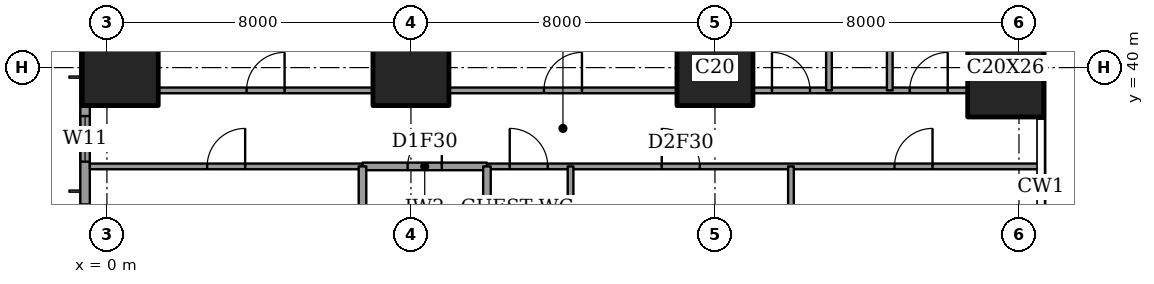
"""IFC4 building model, lengths in metres.
Left out: names, types, materials, properties, quantities, classifications, styles, units other than length and angle.
Written with IfcOpenShell. Run it as: python <this file> out.ifc"""

import sys

from ifc_helpers import new_model, si_unit, direction, frame, frame_2d, origin, origin_2d, place, context, subcontext, project, spatial, rectangle, extrude, element, fill, save


model = new_model("IFC4")
c1 = context("Model", 3, precision=1e-05, world=origin(), true_north=direction((0.0, 1.0)))
c2 = subcontext(c1, "Body", "Model", "MODEL_VIEW")
j1 = project(units=[si_unit("LENGTHUNIT", "METRE"), si_unit("PLANEANGLEUNIT", "RADIAN")], contexts=[c1])
p1 = place(None, origin())
s1 = spatial("IfcSite", under=j1, at=p1, CompositionType="ELEMENT")
p2 = place(p1, origin())
s2 = spatial("IfcBuilding", under=s1, at=p2, CompositionType="ELEMENT")
p3 = place(p2, frame((0.0, 0.0, 135.8)))
s3 = spatial("IfcBuildingStorey", under=s2, at=p3, CompositionType="ELEMENT", Elevation=135.8)
for number, where, z_axis, x_axis in (
    (1, (0.35, 40.0, 0.0), (0.0, 0.0, 1.0), (1.0, 0.0, 0.0)),
    (2, (8.0, 40.0, 0.0), (0.0, 0.0, 1.0), (1.0, 0.0, 0.0)),
    (3, (16.0, 40.0, 0.0), (0.0, 0.0, 1.0), (1.0, 0.0, 0.0)),
):
    element("IfcColumn", number, at=place(p3, frame(where, z_axis=z_axis, x_axis=x_axis)), inside=s3, PredefinedType="COLUMN", context=c2, shape_type="SweptSolid", body=[
        extrude(rectangle(XDim=2.0, YDim=2.0, at=origin_2d()), origin(), (0.0, 0.0, 1.0), 3.6),
    ])
p4 = place(p3, frame((23.65, 40.0, 0.0), z_axis=(0.0, 0.0, 1.0), x_axis=(1.0, 0.0, 0.0)))
e4 = element("IfcColumn", 4, at=p4, inside=s3, PredefinedType="COLUMN", context=c2, shape_type="SweptSolid", body=[
    extrude(rectangle(XDim=2.0, YDim=2.6, at=origin_2d()), origin(), (0.0, 0.0, 1.0), 3.6),
])
p5 = place(p3, frame((-0.575, 44.825, 0.0), z_axis=(0.0, 0.0, 1.0), x_axis=(0.0, -1.0, 0.0)))
e5 = element("IfcWall", 5, at=p5, inside=s3, PredefinedType="SOLIDWALL", context=c2, shape_type="SweptSolid", body=[
    extrude(rectangle(XDim=41.65, YDim=0.25, at=frame_2d((20.825, 0.0))), origin(), (0.0, 0.0, 1.0), 3.6),
])
p6 = place(p5, frame((0.775, 0.0, 0.4)))
e6 = element("IfcOpeningElement", 6, at=p6, cuts=e5, PredefinedType="OPENING", context=c2, shape_type="SweptSolid", body=[
    extrude(rectangle(XDim=2.4, YDim=2.2, at=frame_2d((1.2, 1.1))), frame((0.0, 0.135, 0.0), z_axis=(0.0, -1.0, 0.0), x_axis=(1.0, 0.0, 0.0)), (0.0, 0.0, 1.0), 0.27),
])
p7 = place(p5, frame((6.1, 0.0, 0.4)))
e7 = element("IfcOpeningElement", 7, at=p7, cuts=e5, PredefinedType="OPENING", context=c2, shape_type="SweptSolid", body=[
    extrude(rectangle(XDim=1.2, YDim=2.2, at=frame_2d((0.6, 1.1))), frame((0.0, 0.135, 0.0), z_axis=(0.0, -1.0, 0.0), x_axis=(1.0, 0.0, 0.0)), (0.0, 0.0, 1.0), 0.27),
])
p8 = place(p5, frame((8.425, 0.0, 0.4)))
e8 = element("IfcOpeningElement", 8, at=p8, cuts=e5, PredefinedType="OPENING", context=c2, shape_type="SweptSolid", body=[
    extrude(rectangle(XDim=2.4, YDim=2.2, at=frame_2d((1.2, 1.1))), frame((0.0, 0.135, 0.0), z_axis=(0.0, -1.0, 0.0), x_axis=(1.0, 0.0, 0.0)), (0.0, 0.0, 1.0), 0.27),
])
p9 = place(p5, frame((15.625, 0.0, 0.4)))
e9 = element("IfcOpeningElement", 9, at=p9, cuts=e5, PredefinedType="OPENING", context=c2, shape_type="SweptSolid", body=[
    extrude(rectangle(XDim=2.4, YDim=2.2, at=frame_2d((1.2, 1.1))), frame((0.0, 0.135, 0.0), z_axis=(0.0, -1.0, 0.0), x_axis=(1.0, 0.0, 0.0)), (0.0, 0.0, 1.0), 0.27),
])
p10 = place(p5, frame((23.625, 0.0, 0.4)))
e10 = element("IfcOpeningElement", 10, at=p10, cuts=e5, PredefinedType="OPENING", context=c2, shape_type="SweptSolid", body=[
    extrude(rectangle(XDim=2.4, YDim=2.2, at=frame_2d((1.2, 1.1))), frame((0.0, 0.135, 0.0), z_axis=(0.0, -1.0, 0.0), x_axis=(1.0, 0.0, 0.0)), (0.0, 0.0, 1.0), 0.27),
])
p11 = place(p5, frame((30.825, 0.0, 0.4)))
e11 = element("IfcOpeningElement", 11, at=p11, cuts=e5, PredefinedType="OPENING", context=c2, shape_type="SweptSolid", body=[
    extrude(rectangle(XDim=2.4, YDim=2.2, at=frame_2d((1.2, 1.1))), frame((0.0, 0.135, 0.0), z_axis=(0.0, -1.0, 0.0), x_axis=(1.0, 0.0, 0.0)), (0.0, 0.0, 1.0), 0.27),
])
p12 = place(p5, frame((34.5, 0.0, 0.4)))
e12 = element("IfcOpeningElement", 12, at=p12, cuts=e5, PredefinedType="OPENING", context=c2, shape_type="SweptSolid", body=[
    extrude(rectangle(XDim=1.2, YDim=2.2, at=frame_2d((0.6, 1.1))), frame((0.0, 0.135, 0.0), z_axis=(0.0, -1.0, 0.0), x_axis=(1.0, 0.0, 0.0)), (0.0, 0.0, 1.0), 0.27),
])
p13 = place(p5, frame((38.475, 0.0, 0.4)))
e13 = element("IfcOpeningElement", 13, at=p13, cuts=e5, PredefinedType="OPENING", context=c2, shape_type="SweptSolid", body=[
    extrude(rectangle(XDim=2.4, YDim=2.2, at=frame_2d((1.2, 1.1))), frame((0.0, 0.135, 0.0), z_axis=(0.0, -1.0, 0.0), x_axis=(1.0, 0.0, 0.0)), (0.0, 0.0, 1.0), 0.27),
])
p14 = place(p3, frame((6.725, 37.4, 0.0), z_axis=(0.0, 0.0, 1.0), x_axis=(1.0, 0.0, 0.0)))
e14 = element("IfcWall", 14, at=p14, inside=s3, PredefinedType="PARTITIONING", context=c2, shape_type="SweptSolid", body=[
    extrude(rectangle(XDim=3.275, YDim=0.2, at=frame_2d((1.637, 0.0))), origin(), (0.0, 0.0, 1.0), 3.35),
])
p15 = place(p14, frame((1.188, 0.0, 0.0)))
e15 = element("IfcOpeningElement", 15, at=p15, cuts=e14, PredefinedType="OPENING", context=c2, shape_type="SweptSolid", body=[
    extrude(rectangle(XDim=0.9, YDim=2.1, at=frame_2d((0.45, 1.05))), frame((0.0, 0.11, 0.0), z_axis=(0.0, -1.0, 0.0), x_axis=(1.0, 0.0, 0.0)), (0.0, 0.0, 1.0), 0.22),
])
p16 = place(p3, frame((-0.45, 37.4, 0.0), z_axis=(0.0, 0.0, 1.0), x_axis=(1.0, 0.0, 0.0)))
e16 = element("IfcWall", 16, at=p16, inside=s3, PredefinedType="PARTITIONING", context=c2, shape_type="SweptSolid", body=[
    extrude(rectangle(XDim=7.175, YDim=0.15, at=frame_2d((3.587, 0.0))), origin(), (0.0, 0.0, 1.0), 3.35),
])
p17 = place(p16, frame((3.087, 0.0, 0.0)))
e17 = element("IfcOpeningElement", 17, at=p17, cuts=e16, PredefinedType="OPENING", context=c2, shape_type="SweptSolid", body=[
    extrude(rectangle(XDim=1.0, YDim=2.1, at=frame_2d((0.5, 1.05))), frame((0.0, 0.085, 0.0), z_axis=(0.0, -1.0, 0.0), x_axis=(1.0, 0.0, 0.0)), (0.0, 0.0, 1.0), 0.17),
])
p18 = place(p3, frame((10.0, 37.4, 0.0), z_axis=(0.0, 0.0, 1.0), x_axis=(1.0, 0.0, 0.0)))
e18 = element("IfcWall", 18, at=p18, inside=s3, PredefinedType="PARTITIONING", context=c2, shape_type="SweptSolid", body=[
    extrude(rectangle(XDim=14.561, YDim=0.15, at=frame_2d((7.281, 0.0))), origin(), (0.0, 0.0, 1.0), 3.35),
])
p19 = place(p18, frame((0.6, 0.0, 0.0)))
e19 = element("IfcOpeningElement", 19, at=p19, cuts=e18, PredefinedType="OPENING", context=c2, shape_type="SweptSolid", body=[
    extrude(rectangle(XDim=1.0, YDim=2.1, at=frame_2d((0.5, 1.05))), frame((0.0, 0.085, 0.0), z_axis=(0.0, -1.0, 0.0), x_axis=(1.0, 0.0, 0.0)), (0.0, 0.0, 1.0), 0.17),
])
p20 = place(p18, frame((4.6, 0.0, 0.0)))
e20 = element("IfcOpeningElement", 20, at=p20, cuts=e18, PredefinedType="OPENING", context=c2, shape_type="SweptSolid", body=[
    extrude(rectangle(XDim=1.0, YDim=2.1, at=frame_2d((0.5, 1.05))), frame((0.0, 0.085, 0.0), z_axis=(0.0, -1.0, 0.0), x_axis=(1.0, 0.0, 0.0)), (0.0, 0.0, 1.0), 0.17),
])
p21 = place(p18, frame((10.725, 0.0, 0.0)))
e21 = element("IfcOpeningElement", 21, at=p21, cuts=e18, PredefinedType="OPENING", context=c2, shape_type="SweptSolid", body=[
    extrude(rectangle(XDim=1.0, YDim=2.1, at=frame_2d((0.5, 1.05))), frame((0.0, 0.085, 0.0), z_axis=(0.0, -1.0, 0.0), x_axis=(1.0, 0.0, 0.0)), (0.0, 0.0, 1.0), 0.17),
])
p22 = place(p3, frame((1.35, 39.4, 0.0), z_axis=(0.0, 0.0, 1.0), x_axis=(1.0, 0.0, 0.0)))
e22 = element("IfcWall", 22, at=p22, inside=s3, PredefinedType="PARTITIONING", context=c2, shape_type="SweptSolid", body=[
    extrude(rectangle(XDim=5.65, YDim=0.15, at=frame_2d((2.825, 0.0))), origin(), (0.0, 0.0, 1.0), 3.35),
])
p23 = place(p22, frame((2.325, 0.0, 0.0)))
e23 = element("IfcOpeningElement", 23, at=p23, cuts=e22, PredefinedType="OPENING", context=c2, shape_type="SweptSolid", body=[
    extrude(rectangle(XDim=1.0, YDim=2.1, at=frame_2d((0.5, 1.05))), frame((0.0, 0.085, 0.0), z_axis=(0.0, -1.0, 0.0), x_axis=(1.0, 0.0, 0.0)), (0.0, 0.0, 1.0), 0.17),
])
p24 = place(p3, frame((9.0, 39.4, 0.0), z_axis=(0.0, 0.0, 1.0), x_axis=(1.0, 0.0, 0.0)))
e24 = element("IfcWall", 24, at=p24, inside=s3, PredefinedType="PARTITIONING", context=c2, shape_type="SweptSolid", body=[
    extrude(rectangle(XDim=6.0, YDim=0.15, at=frame_2d((3.0, 0.0))), origin(), (0.0, 0.0, 1.0), 3.35),
])
p25 = place(p24, frame((2.5, 0.0, 0.0)))
e25 = element("IfcOpeningElement", 25, at=p25, cuts=e24, PredefinedType="OPENING", context=c2, shape_type="SweptSolid", body=[
    extrude(rectangle(XDim=1.0, YDim=2.1, at=frame_2d((0.5, 1.05))), frame((0.0, 0.085, 0.0), z_axis=(0.0, -1.0, 0.0), x_axis=(1.0, 0.0, 0.0)), (0.0, 0.0, 1.0), 0.17),
])
p26 = place(p3, frame((17.0, 39.4, 0.0), z_axis=(0.0, 0.0, 1.0), x_axis=(1.0, 0.0, 0.0)))
e26 = element("IfcWall", 26, at=p26, inside=s3, PredefinedType="PARTITIONING", context=c2, shape_type="SweptSolid", body=[
    extrude(rectangle(XDim=5.65, YDim=0.15, at=frame_2d((2.825, 0.0))), origin(), (0.0, 0.0, 1.0), 3.35),
])
p27 = place(p26, frame((0.5, 0.0, 0.0)))
e27 = element("IfcOpeningElement", 27, at=p27, cuts=e26, PredefinedType="OPENING", context=c2, shape_type="SweptSolid", body=[
    extrude(rectangle(XDim=1.0, YDim=2.1, at=frame_2d((0.5, 1.05))), frame((0.0, 0.085, 0.0), z_axis=(0.0, -1.0, 0.0), x_axis=(1.0, 0.0, 0.0)), (0.0, 0.0, 1.0), 0.17),
])
p28 = place(p26, frame((4.125, 0.0, 0.0)))
e28 = element("IfcOpeningElement", 28, at=p28, cuts=e26, PredefinedType="OPENING", context=c2, shape_type="SweptSolid", body=[
    extrude(rectangle(XDim=1.0, YDim=2.1, at=frame_2d((0.5, 1.05))), frame((0.0, 0.085, 0.0), z_axis=(0.0, -1.0, 0.0), x_axis=(1.0, 0.0, 0.0)), (0.0, 0.0, 1.0), 0.17),
])
p29 = place(p3, frame((6.725, 33.2, 0.0), z_axis=(0.0, 0.0, 1.0), x_axis=(0.0, 1.0, 0.0)))
e29 = element("IfcWall", 29, at=p29, inside=s3, PredefinedType="PARTITIONING", context=c2, shape_type="SweptSolid", body=[
    extrude(rectangle(XDim=4.2, YDim=0.2, at=frame_2d((2.1, 0.0))), origin(), (0.0, 0.0, 1.0), 3.35),
])
p30 = place(p3, frame((10.0, 31.0, 0.0), z_axis=(0.0, 0.0, 1.0), x_axis=(0.0, 1.0, 0.0)))
e30 = element("IfcWall", 30, at=p30, inside=s3, PredefinedType="PARTITIONING", context=c2, shape_type="SweptSolid", body=[
    extrude(rectangle(XDim=6.4, YDim=0.2, at=frame_2d((3.2, 0.0))), origin(), (0.0, 0.0, 1.0), 3.35),
])
p31 = place(p3, frame((12.2, 30.675, 0.0), z_axis=(0.0, 0.0, 1.0), x_axis=(0.0, 1.0, 0.0)))
e31 = element("IfcWall", 31, at=p31, inside=s3, PredefinedType="PARTITIONING", context=c2, shape_type="SweptSolid", body=[
    extrude(rectangle(XDim=6.725, YDim=0.15, at=frame_2d((3.362, 0.0))), origin(), (0.0, 0.0, 1.0), 3.35),
])
p32 = place(p3, frame((18.0, 28.0, 0.0), z_axis=(0.0, 0.0, 1.0), x_axis=(0.0, 1.0, 0.0)))
e32 = element("IfcWall", 32, at=p32, inside=s3, PredefinedType="PARTITIONING", context=c2, shape_type="SweptSolid", body=[
    extrude(rectangle(XDim=9.4, YDim=0.15, at=frame_2d((4.7, 0.0))), origin(), (0.0, 0.0, 1.0), 3.35),
])
p33 = place(p32, frame((0.887, 0.0, 0.0)))
e33 = element("IfcOpeningElement", 33, at=p33, cuts=e32, PredefinedType="OPENING", context=c2, shape_type="SweptSolid", body=[
    extrude(rectangle(XDim=0.9, YDim=2.1, at=frame_2d((0.45, 1.05))), frame((0.0, 0.085, 0.0), z_axis=(0.0, -1.0, 0.0), x_axis=(1.0, 0.0, 0.0)), (0.0, 0.0, 1.0), 0.17),
])
p34 = place(p3, frame((19.0, 39.4, 0.0), z_axis=(0.0, 0.0, 1.0), x_axis=(0.0, 1.0, 0.0)))
e34 = element("IfcWall", 34, at=p34, inside=s3, PredefinedType="PARTITIONING", context=c2, shape_type="SweptSolid", body=[
    extrude(rectangle(XDim=9.05, YDim=0.15, at=frame_2d((4.525, 0.0))), origin(), (0.0, 0.0, 1.0), 3.35),
])
p35 = place(p3, frame((20.6, 39.4, 0.0), z_axis=(0.0, 0.0, 1.0), x_axis=(0.0, 1.0, 0.0)))
e35 = element("IfcWall", 35, at=p35, inside=s3, PredefinedType="PARTITIONING", context=c2, shape_type="SweptSolid", body=[
    extrude(rectangle(XDim=9.05, YDim=0.15, at=frame_2d((4.525, 0.0))), origin(), (0.0, 0.0, 1.0), 3.35),
])
p36 = place(p35, frame((4.075, 0.0, 0.0)))
e36 = element("IfcOpeningElement", 36, at=p36, cuts=e35, PredefinedType="OPENING", context=c2, shape_type="SweptSolid", body=[
    extrude(rectangle(XDim=0.9, YDim=2.1, at=frame_2d((0.45, 1.05))), frame((0.0, 0.085, 0.0), z_axis=(0.0, -1.0, 0.0), x_axis=(1.0, 0.0, 0.0)), (0.0, 0.0, 1.0), 0.17),
])
p37 = place(p7, origin())
e37 = element("IfcWindow", 37, at=p37, inside=s3, PartitioningType="SINGLE_PANEL", PredefinedType="WINDOW", context=c2, shape_type="SweptSolid", body=[
    extrude(rectangle(XDim=1.2, YDim=2.2, at=frame_2d((0.6, 1.1))), frame((0.0, 0.03, 0.0), z_axis=(0.0, -1.0, 0.0), x_axis=(1.0, 0.0, 0.0)), (0.0, 0.0, 1.0), 0.06),
])
fill(e7, e37)
p38 = place(p23, origin())
e38 = element("IfcDoor", 38, at=p38, inside=s3, OperationType="SINGLE_SWING_LEFT", PredefinedType="DOOR", context=c2, shape_type="SweptSolid", body=[
    extrude(rectangle(XDim=1.0, YDim=2.1, at=frame_2d((0.5, 1.05))), frame((0.0, 0.025, 0.0), z_axis=(0.0, -1.0, 0.0), x_axis=(1.0, 0.0, 0.0)), (0.0, 0.0, 1.0), 0.05),
])
fill(e23, e38)
p39 = place(p25, origin())
e39 = element("IfcDoor", 39, at=p39, inside=s3, OperationType="SINGLE_SWING_LEFT", PredefinedType="DOOR", context=c2, shape_type="SweptSolid", body=[
    extrude(rectangle(XDim=1.0, YDim=2.1, at=frame_2d((0.5, 1.05))), frame((0.0, 0.025, 0.0), z_axis=(0.0, -1.0, 0.0), x_axis=(1.0, 0.0, 0.0)), (0.0, 0.0, 1.0), 0.05),
])
fill(e25, e39)
p40 = place(p27, origin())
e40 = element("IfcDoor", 40, at=p40, inside=s3, OperationType="SINGLE_SWING_RIGHT", PredefinedType="DOOR", context=c2, shape_type="SweptSolid", body=[
    extrude(rectangle(XDim=1.0, YDim=2.1, at=frame_2d((0.5, 1.05))), frame((0.0, 0.025, 0.0), z_axis=(0.0, -1.0, 0.0), x_axis=(1.0, 0.0, 0.0)), (0.0, 0.0, 1.0), 0.05),
])
fill(e27, e40)
p41 = place(p28, origin())
e41 = element("IfcDoor", 41, at=p41, inside=s3, OperationType="SINGLE_SWING_LEFT", PredefinedType="DOOR", context=c2, shape_type="SweptSolid", body=[
    extrude(rectangle(XDim=1.0, YDim=2.1, at=frame_2d((0.5, 1.05))), frame((0.0, 0.025, 0.0), z_axis=(0.0, -1.0, 0.0), x_axis=(1.0, 0.0, 0.0)), (0.0, 0.0, 1.0), 0.05),
])
fill(e28, e41)
p42 = place(p19, origin())
e42 = element("IfcDoor", 42, at=p42, inside=s3, OperationType="SINGLE_SWING_RIGHT", PredefinedType="DOOR", context=c2, shape_type="SweptSolid", body=[
    extrude(rectangle(XDim=1.0, YDim=2.1, at=frame_2d((0.5, 1.05))), frame((0.0, 0.025, 0.0), z_axis=(0.0, -1.0, 0.0), x_axis=(1.0, 0.0, 0.0)), (0.0, 0.0, 1.0), 0.05),
])
fill(e19, e42)
p43 = place(p17, origin())
e43 = element("IfcDoor", 43, at=p43, inside=s3, OperationType="SINGLE_SWING_LEFT", PredefinedType="DOOR", context=c2, shape_type="SweptSolid", body=[
    extrude(rectangle(XDim=1.0, YDim=2.1, at=frame_2d((0.5, 1.05))), frame((0.0, 0.025, 0.0), z_axis=(0.0, -1.0, 0.0), x_axis=(1.0, 0.0, 0.0)), (0.0, 0.0, 1.0), 0.05),
])
fill(e17, e43)
p44 = place(p15, origin())
e44 = element("IfcDoor", 44, at=p44, inside=s3, OperationType="SINGLE_SWING_LEFT", PredefinedType="DOOR", context=c2, shape_type="SweptSolid", body=[
    extrude(rectangle(XDim=0.9, YDim=2.1, at=frame_2d((0.45, 1.05))), frame((0.0, 0.025, 0.0), z_axis=(0.0, -1.0, 0.0), x_axis=(1.0, 0.0, 0.0)), (0.0, 0.0, 1.0), 0.05),
])
fill(e15, e44)
p45 = place(p20, origin())
e45 = element("IfcDoor", 45, at=p45, inside=s3, OperationType="SINGLE_SWING_RIGHT", PredefinedType="DOOR", context=c2, shape_type="SweptSolid", body=[
    extrude(rectangle(XDim=1.0, YDim=2.1, at=frame_2d((0.5, 1.05))), frame((0.0, 0.025, 0.0), z_axis=(0.0, -1.0, 0.0), x_axis=(1.0, 0.0, 0.0)), (0.0, 0.0, 1.0), 0.05),
])
fill(e20, e45)
p46 = place(p21, origin())
e46 = element("IfcDoor", 46, at=p46, inside=s3, OperationType="SINGLE_SWING_LEFT", PredefinedType="DOOR", context=c2, shape_type="SweptSolid", body=[
    extrude(rectangle(XDim=1.0, YDim=2.1, at=frame_2d((0.5, 1.05))), frame((0.0, 0.025, 0.0), z_axis=(0.0, -1.0, 0.0), x_axis=(1.0, 0.0, 0.0)), (0.0, 0.0, 1.0), 0.05),
])
fill(e21, e46)
save(model, sys.argv[1])
